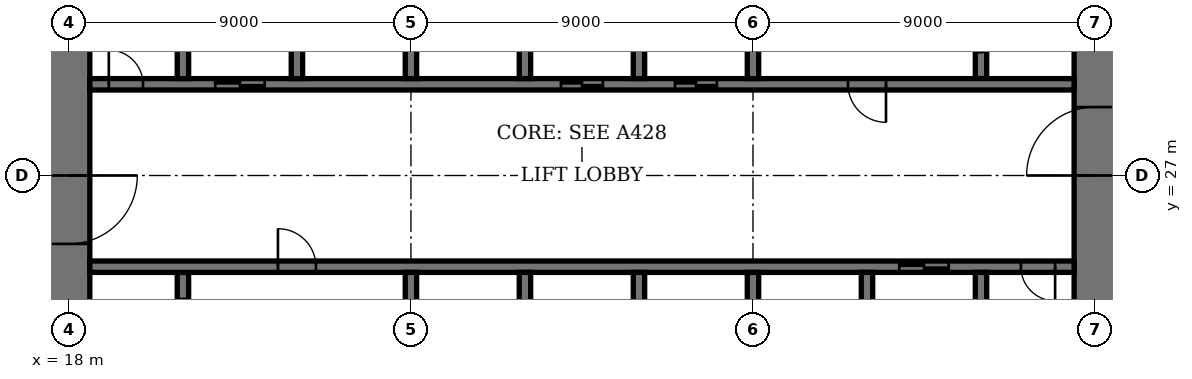
"""IFC4 building model, lengths in metres.
Left out: names, types, materials, properties, quantities, classifications, styles, units other than length and angle.
Written with IfcOpenShell. Run it as: python <this file> out.ifc"""

import sys

from ifc_helpers import new_model, si_unit, direction, frame, frame_2d, origin, place, context, subcontext, project, spatial, rectangle, extrude, element, fill, save


model = new_model("IFC4")
c1 = context("Model", 3, precision=1e-05, world=origin(), true_north=direction((0.0, 1.0)))
c2 = subcontext(c1, "Body", "Model", "MODEL_VIEW")
j1 = project(units=[si_unit("LENGTHUNIT", "METRE"), si_unit("PLANEANGLEUNIT", "RADIAN")], contexts=[c1])
p1 = place(None, origin())
s1 = spatial("IfcSite", under=j1, at=p1, CompositionType="ELEMENT")
p2 = place(p1, origin())
s2 = spatial("IfcBuilding", under=s1, at=p2, CompositionType="ELEMENT")
p3 = place(p2, frame((0.0, 0.0, 125.0)))
s3 = spatial("IfcBuildingStorey", under=s2, at=p3, CompositionType="ELEMENT", Elevation=125.0)
p4 = place(p3, frame((18.0, 35.45, 0.0), z_axis=(0.0, 0.0, 1.0), x_axis=(0.0, -1.0, 0.0)))
e1 = element("IfcWall", 1, at=p4, inside=s3, PredefinedType="SHEAR", context=c2, shape_type="SweptSolid", body=[
    extrude(rectangle(XDim=16.9, YDim=1.1, at=frame_2d((8.45, 0.0))), origin(), (0.0, 0.0, 1.0), 4.0),
])
p5 = place(p4, frame((8.45, 0.0, 0.0)))
e2 = element("IfcOpeningElement", 2, at=p5, cuts=e1, PredefinedType="OPENING", context=c2, shape_type="SweptSolid", body=[
    extrude(rectangle(XDim=1.8, YDim=2.4, at=frame_2d((0.9, 1.2))), frame((0.0, 0.56, 0.0), z_axis=(0.0, -1.0, 0.0), x_axis=(1.0, 0.0, 0.0)), (0.0, 0.0, 1.0), 1.12),
])
p6 = place(p3, frame((45.0, 18.55, 0.0), z_axis=(0.0, 0.0, 1.0), x_axis=(0.0, 1.0, 0.0)))
e3 = element("IfcWall", 3, at=p6, inside=s3, PredefinedType="SHEAR", context=c2, shape_type="SweptSolid", body=[
    extrude(rectangle(XDim=16.9, YDim=1.1, at=frame_2d((8.45, 0.0))), origin(), (0.0, 0.0, 1.0), 4.0),
])
p7 = place(p6, frame((8.45, 0.0, 0.0)))
e4 = element("IfcOpeningElement", 4, at=p7, cuts=e3, PredefinedType="OPENING", context=c2, shape_type="SweptSolid", body=[
    extrude(rectangle(XDim=1.8, YDim=2.4, at=frame_2d((0.9, 1.2))), frame((0.0, 0.56, 0.0), z_axis=(0.0, -1.0, 0.0), x_axis=(1.0, 0.0, 0.0)), (0.0, 0.0, 1.0), 1.12),
])
p8 = place(p3, frame((21.0, 21.95, 0.0), z_axis=(0.0, 0.0, 1.0), x_axis=(0.0, 1.0, 0.0)))
e5 = element("IfcWall", 5, at=p8, inside=s3, PredefinedType="SHEAR", context=c2, shape_type="SweptSolid", body=[
    extrude(rectangle(XDim=2.5, YDim=0.3, at=frame_2d((1.25, 0.0))), origin(), (0.0, 0.0, 1.0), 4.0),
])
p9 = place(p8, frame((0.7, 0.0, 0.0)))
e6 = element("IfcOpeningElement", 6, at=p9, cuts=e5, PredefinedType="OPENING", context=c2, shape_type="SweptSolid", body=[
    extrude(rectangle(XDim=1.1, YDim=2.4, at=frame_2d((0.55, 1.2))), frame((0.0, 0.16, 0.0), z_axis=(0.0, -1.0, 0.0), x_axis=(1.0, 0.0, 0.0)), (0.0, 0.0, 1.0), 0.32),
])
p10 = place(p3, frame((42.0, 29.55, 0.0), z_axis=(0.0, 0.0, 1.0), x_axis=(0.0, 1.0, 0.0)))
e7 = element("IfcWall", 7, at=p10, inside=s3, PredefinedType="SHEAR", context=c2, shape_type="SweptSolid", body=[
    extrude(rectangle(XDim=2.5, YDim=0.3, at=frame_2d((1.25, 0.0))), origin(), (0.0, 0.0, 1.0), 4.0),
])
p11 = place(p10, frame((0.7, 0.0, 0.0)))
e8 = element("IfcOpeningElement", 8, at=p11, cuts=e7, PredefinedType="OPENING", context=c2, shape_type="SweptSolid", body=[
    extrude(rectangle(XDim=1.1, YDim=2.4, at=frame_2d((0.55, 1.2))), frame((0.0, 0.16, 0.0), z_axis=(0.0, -1.0, 0.0), x_axis=(1.0, 0.0, 0.0)), (0.0, 0.0, 1.0), 0.32),
])
p12 = place(p3, frame((18.55, 24.6, 0.0), z_axis=(0.0, 0.0, 1.0), x_axis=(1.0, 0.0, 0.0)))
e9 = element("IfcWall", 9, at=p12, inside=s3, PredefinedType="SHEAR", context=c2, shape_type="SweptSolid", body=[
    extrude(rectangle(XDim=25.9, YDim=0.3, at=frame_2d((12.95, 0.0))), origin(), (0.0, 0.0, 1.0), 4.0),
])
p13 = place(p12, frame((4.95, 0.0, 0.0)))
e10 = element("IfcOpeningElement", 10, at=p13, cuts=e9, PredefinedType="OPENING", context=c2, shape_type="SweptSolid", body=[
    extrude(rectangle(XDim=1.0, YDim=2.4, at=frame_2d((0.5, 1.2))), frame((0.0, 0.16, 0.0), z_axis=(0.0, -1.0, 0.0), x_axis=(1.0, 0.0, 0.0)), (0.0, 0.0, 1.0), 0.32),
])
p14 = place(p12, frame((24.5, 0.0, 0.0)))
e11 = element("IfcOpeningElement", 11, at=p14, cuts=e9, PredefinedType="OPENING", context=c2, shape_type="SweptSolid", body=[
    extrude(rectangle(XDim=0.9, YDim=2.1, at=frame_2d((0.45, 1.05))), frame((0.0, 0.16, 0.0), z_axis=(0.0, -1.0, 0.0), x_axis=(1.0, 0.0, 0.0)), (0.0, 0.0, 1.0), 0.32),
])
p15 = place(p12, frame((21.3, 0.0, 0.0)))
e12 = element("IfcOpeningElement", 12, at=p15, cuts=e9, PredefinedType="OPENING", context=c2, shape_type="SweptSolid", body=[
    extrude(rectangle(XDim=1.3, YDim=2.4, at=frame_2d((0.65, 1.2))), frame((0.0, 0.16, 0.0), z_axis=(0.0, -1.0, 0.0), x_axis=(1.0, 0.0, 0.0)), (0.0, 0.0, 1.0), 0.32),
])
p16 = place(p3, frame((18.55, 29.4, 0.0), z_axis=(0.0, 0.0, 1.0), x_axis=(1.0, 0.0, 0.0)))
e13 = element("IfcWall", 13, at=p16, inside=s3, PredefinedType="SHEAR", context=c2, shape_type="SweptSolid", body=[
    extrude(rectangle(XDim=25.9, YDim=0.3, at=frame_2d((12.95, 0.0))), origin(), (0.0, 0.0, 1.0), 4.0),
])
p17 = place(p16, frame((19.95, 0.0, 0.0)))
e14 = element("IfcOpeningElement", 14, at=p17, cuts=e13, PredefinedType="OPENING", context=c2, shape_type="SweptSolid", body=[
    extrude(rectangle(XDim=1.0, YDim=2.4, at=frame_2d((0.5, 1.2))), frame((0.0, 0.16, 0.0), z_axis=(0.0, -1.0, 0.0), x_axis=(1.0, 0.0, 0.0)), (0.0, 0.0, 1.0), 0.32),
])
p18 = place(p16, frame((0.5, 0.0, 0.0)))
e15 = element("IfcOpeningElement", 15, at=p18, cuts=e13, PredefinedType="OPENING", context=c2, shape_type="SweptSolid", body=[
    extrude(rectangle(XDim=0.9, YDim=2.1, at=frame_2d((0.45, 1.05))), frame((0.0, 0.16, 0.0), z_axis=(0.0, -1.0, 0.0), x_axis=(1.0, 0.0, 0.0)), (0.0, 0.0, 1.0), 0.32),
])
p19 = place(p16, frame((15.4, 0.0, 0.0)))
e16 = element("IfcOpeningElement", 16, at=p19, cuts=e13, PredefinedType="OPENING", context=c2, shape_type="SweptSolid", body=[
    extrude(rectangle(XDim=1.1, YDim=2.4, at=frame_2d((0.55, 1.2))), frame((0.0, 0.16, 0.0), z_axis=(0.0, -1.0, 0.0), x_axis=(1.0, 0.0, 0.0)), (0.0, 0.0, 1.0), 0.32),
])
p20 = place(p16, frame((12.4, 0.0, 0.0)))
e17 = element("IfcOpeningElement", 17, at=p20, cuts=e13, PredefinedType="OPENING", context=c2, shape_type="SweptSolid", body=[
    extrude(rectangle(XDim=1.1, YDim=2.4, at=frame_2d((0.55, 1.2))), frame((0.0, 0.16, 0.0), z_axis=(0.0, -1.0, 0.0), x_axis=(1.0, 0.0, 0.0)), (0.0, 0.0, 1.0), 0.32),
])
p21 = place(p16, frame((3.3, 0.0, 0.0)))
e18 = element("IfcOpeningElement", 18, at=p21, cuts=e13, PredefinedType="OPENING", context=c2, shape_type="SweptSolid", body=[
    extrude(rectangle(XDim=1.3, YDim=2.4, at=frame_2d((0.65, 1.2))), frame((0.0, 0.16, 0.0), z_axis=(0.0, -1.0, 0.0), x_axis=(1.0, 0.0, 0.0)), (0.0, 0.0, 1.0), 0.32),
])
for number, where, z_axis, x_axis in (
    (19, (30.0, 21.75, 0.0), (0.0, 0.0, 1.0), (0.0, 1.0, 0.0)),
    (20, (33.0, 29.55, 0.0), (0.0, 0.0, 1.0), (0.0, 1.0, 0.0)),
    (21, (33.0, 21.75, 0.0), (0.0, 0.0, 1.0), (0.0, 1.0, 0.0)),
    (22, (30.0, 29.55, 0.0), (0.0, 0.0, 1.0), (0.0, 1.0, 0.0)),
    (23, (36.0, 21.75, 0.0), (0.0, 0.0, 1.0), (0.0, 1.0, 0.0)),
    (24, (27.0, 29.55, 0.0), (0.0, 0.0, 1.0), (0.0, 1.0, 0.0)),
):
    element("IfcWall", number, at=place(p3, frame(where, z_axis=z_axis, x_axis=x_axis)), inside=s3, PredefinedType="SHEAR", context=c2, shape_type="SweptSolid", body=[
        extrude(rectangle(XDim=2.7, YDim=0.3, at=frame_2d((1.35, 0.0))), origin(), (0.0, 0.0, 1.0), 4.0),
    ])
for number, where, z_axis, x_axis in (
    (25, (39.0, 18.55, 0.0), (0.0, 0.0, 1.0), (0.0, 1.0, 0.0)),
    (26, (24.0, 29.55, 0.0), (0.0, 0.0, 1.0), (0.0, 1.0, 0.0)),
):
    element("IfcWall", number, at=place(p3, frame(where, z_axis=z_axis, x_axis=x_axis)), inside=s3, PredefinedType="SHEAR", context=c2, shape_type="SweptSolid", body=[
        extrude(rectangle(XDim=5.9, YDim=0.3, at=frame_2d((2.95, 0.0))), origin(), (0.0, 0.0, 1.0), 4.0),
    ])
for number, where, z_axis, x_axis in (
    (27, (42.0, 21.75, 0.0), (0.0, 0.0, 1.0), (0.0, 1.0, 0.0)),
    (28, (21.0, 29.55, 0.0), (0.0, 0.0, 1.0), (0.0, 1.0, 0.0)),
):
    element("IfcWall", number, at=place(p3, frame(where, z_axis=z_axis, x_axis=x_axis)), inside=s3, PredefinedType="SHEAR", context=c2, shape_type="SweptSolid", body=[
        extrude(rectangle(XDim=2.7, YDim=0.3, at=frame_2d((1.35, 0.0))), origin(), (0.0, 0.0, 1.0), 4.0),
    ])
for number, where, z_axis, x_axis in (
    (29, (27.0, 21.6, 0.0), (0.0, 0.0, 1.0), (0.0, 1.0, 0.0)),
    (30, (36.0, 29.55, 0.0), (0.0, 0.0, 1.0), (0.0, 1.0, 0.0)),
):
    element("IfcWall", number, at=place(p3, frame(where, z_axis=z_axis, x_axis=x_axis)), inside=s3, PredefinedType="SHEAR", context=c2, shape_type="SweptSolid", body=[
        extrude(rectangle(XDim=2.85, YDim=0.3, at=frame_2d((1.425, 0.0))), origin(), (0.0, 0.0, 1.0), 4.0),
    ])
p22 = place(p5, origin())
e31 = element("IfcDoor", 31, at=p22, inside=s3, OperationType="DOUBLE_DOOR_DOUBLE_SWING", PredefinedType="DOOR", context=c2, shape_type="SweptSolid", body=[
    extrude(rectangle(XDim=1.8, YDim=2.4, at=frame_2d((0.9, 1.2))), frame((0.0, 0.03, 0.0), z_axis=(0.0, -1.0, 0.0), x_axis=(1.0, 0.0, 0.0)), (0.0, 0.0, 1.0), 0.06),
    extrude(rectangle(XDim=0.04, YDim=2.4, at=frame_2d((0.02, 1.2))), frame((0.0, 0.55, 0.0), z_axis=(0.0, -1.0, 0.0), x_axis=(1.0, 0.0, 0.0)), (0.0, 0.0, 1.0), 1.1),
    extrude(rectangle(XDim=0.04, YDim=2.4, at=frame_2d((1.78, 1.2))), frame((0.0, 0.55, 0.0), z_axis=(0.0, -1.0, 0.0), x_axis=(1.0, 0.0, 0.0)), (0.0, 0.0, 1.0), 1.1),
    extrude(rectangle(XDim=1.8, YDim=0.04, at=frame_2d((0.9, 2.38))), frame((0.0, 0.55, 0.0), z_axis=(0.0, -1.0, 0.0), x_axis=(1.0, 0.0, 0.0)), (0.0, 0.0, 1.0), 1.1),
])
fill(e2, e31)
p23 = place(p7, origin())
e32 = element("IfcDoor", 32, at=p23, inside=s3, OperationType="DOUBLE_DOOR_DOUBLE_SWING", PredefinedType="DOOR", context=c2, shape_type="SweptSolid", body=[
    extrude(rectangle(XDim=1.8, YDim=2.4, at=frame_2d((0.9, 1.2))), frame((0.0, 0.03, 0.0), z_axis=(0.0, -1.0, 0.0), x_axis=(1.0, 0.0, 0.0)), (0.0, 0.0, 1.0), 0.06),
    extrude(rectangle(XDim=0.04, YDim=2.4, at=frame_2d((0.02, 1.2))), frame((0.0, 0.55, 0.0), z_axis=(0.0, -1.0, 0.0), x_axis=(1.0, 0.0, 0.0)), (0.0, 0.0, 1.0), 1.1),
    extrude(rectangle(XDim=0.04, YDim=2.4, at=frame_2d((1.78, 1.2))), frame((0.0, 0.55, 0.0), z_axis=(0.0, -1.0, 0.0), x_axis=(1.0, 0.0, 0.0)), (0.0, 0.0, 1.0), 1.1),
    extrude(rectangle(XDim=1.8, YDim=0.04, at=frame_2d((0.9, 2.38))), frame((0.0, 0.55, 0.0), z_axis=(0.0, -1.0, 0.0), x_axis=(1.0, 0.0, 0.0)), (0.0, 0.0, 1.0), 1.1),
])
fill(e4, e32)
p24 = place(p13, origin())
e33 = element("IfcDoor", 33, at=p24, inside=s3, OperationType="SINGLE_SWING_RIGHT", PredefinedType="DOOR", context=c2, shape_type="SweptSolid", body=[
    extrude(rectangle(XDim=1.0, YDim=2.4, at=frame_2d((0.5, 1.2))), frame((0.0, 0.03, 0.0), z_axis=(0.0, -1.0, 0.0), x_axis=(1.0, 0.0, 0.0)), (0.0, 0.0, 1.0), 0.06),
])
fill(e10, e33)
p25 = place(p17, origin())
e34 = element("IfcDoor", 34, at=p25, inside=s3, OperationType="SINGLE_SWING_RIGHT", PredefinedType="DOOR", context=c2, shape_type="SweptSolid", body=[
    extrude(rectangle(XDim=1.0, YDim=2.4, at=frame_2d((0.5, 1.2))), frame((0.0, 0.03, 0.0), z_axis=(0.0, -1.0, 0.0), x_axis=(1.0, 0.0, 0.0)), (0.0, 0.0, 1.0), 0.06),
])
fill(e14, e34)
p26 = place(p14, origin())
e35 = element("IfcDoor", 35, at=p26, inside=s3, OperationType="SINGLE_SWING_RIGHT", PredefinedType="DOOR", context=c2, shape_type="SweptSolid", body=[
    extrude(rectangle(XDim=0.9, YDim=2.1, at=frame_2d((0.45, 1.05))), frame((0.0, 0.03, 0.0), z_axis=(0.0, -1.0, 0.0), x_axis=(1.0, 0.0, 0.0)), (0.0, 0.0, 1.0), 0.06),
])
fill(e11, e35)
p27 = place(p18, origin())
e36 = element("IfcDoor", 36, at=p27, inside=s3, OperationType="SINGLE_SWING_RIGHT", PredefinedType="DOOR", context=c2, shape_type="SweptSolid", body=[
    extrude(rectangle(XDim=0.9, YDim=2.1, at=frame_2d((0.45, 1.05))), frame((0.0, 0.03, 0.0), z_axis=(0.0, -1.0, 0.0), x_axis=(1.0, 0.0, 0.0)), (0.0, 0.0, 1.0), 0.06),
])
fill(e15, e36)
p28 = place(p19, origin())
e37 = element("IfcDoor", 37, at=p28, inside=s3, OperationType="DOUBLE_DOOR_SLIDING", PredefinedType="DOOR", context=c2, shape_type="SweptSolid", body=[
    extrude(rectangle(XDim=1.1, YDim=2.4, at=frame_2d((0.55, 1.2))), frame((0.0, 0.02, 0.0), z_axis=(0.0, -1.0, 0.0), x_axis=(1.0, 0.0, 0.0)), (0.0, 0.0, 1.0), 0.04),
])
fill(e16, e37)
p29 = place(p20, origin())
e38 = element("IfcDoor", 38, at=p29, inside=s3, OperationType="DOUBLE_DOOR_SLIDING", PredefinedType="DOOR", context=c2, shape_type="SweptSolid", body=[
    extrude(rectangle(XDim=1.1, YDim=2.4, at=frame_2d((0.55, 1.2))), frame((0.0, 0.02, 0.0), z_axis=(0.0, -1.0, 0.0), x_axis=(1.0, 0.0, 0.0)), (0.0, 0.0, 1.0), 0.04),
])
fill(e17, e38)
p30 = place(p15, origin())
e39 = element("IfcDoor", 39, at=p30, inside=s3, OperationType="DOUBLE_DOOR_SLIDING", PredefinedType="DOOR", context=c2, shape_type="SweptSolid", body=[
    extrude(rectangle(XDim=1.3, YDim=2.4, at=frame_2d((0.65, 1.2))), frame((0.0, 0.02, 0.0), z_axis=(0.0, -1.0, 0.0), x_axis=(1.0, 0.0, 0.0)), (0.0, 0.0, 1.0), 0.04),
])
fill(e12, e39)
p31 = place(p21, origin())
e40 = element("IfcDoor", 40, at=p31, inside=s3, OperationType="DOUBLE_DOOR_SLIDING", PredefinedType="DOOR", context=c2, shape_type="SweptSolid", body=[
    extrude(rectangle(XDim=1.3, YDim=2.4, at=frame_2d((0.65, 1.2))), frame((0.0, 0.02, 0.0), z_axis=(0.0, -1.0, 0.0), x_axis=(1.0, 0.0, 0.0)), (0.0, 0.0, 1.0), 0.04),
])
fill(e18, e40)
save(model, sys.argv[1])
